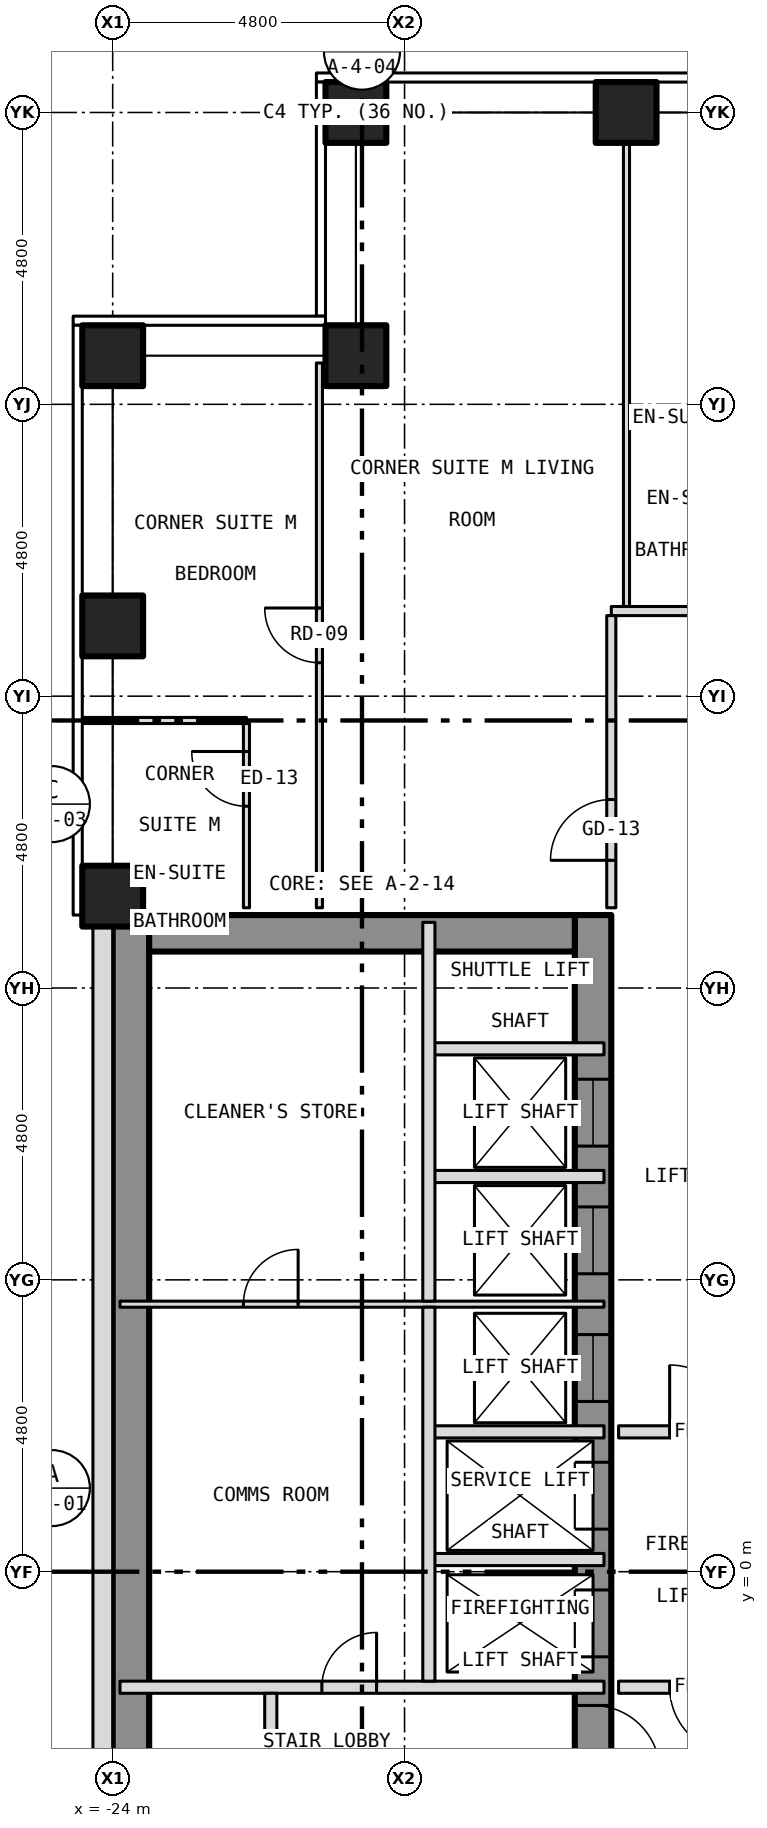
"""IFC4 building model, lengths in metres.
Left out: names, types, materials, properties, quantities, classifications, styles, units other than length and angle.
Written with IfcOpenShell. Run it as: python <this file> out.ifc"""

import sys

from ifc_helpers import new_model, si_unit, direction, frame, frame_2d, origin, origin_2d, place, context, subcontext, project, spatial, rectangle, hollow_rectangle, extrude, element, fill, save


model = new_model("IFC4")
c1 = context("Model", 3, precision=1e-05, world=origin(), true_north=direction((0.0, 1.0)))
c2 = subcontext(c1, "Body", "Model", "MODEL_VIEW")
j1 = project(units=[si_unit("LENGTHUNIT", "METRE"), si_unit("PLANEANGLEUNIT", "RADIAN")], contexts=[c1])
p1 = place(None, origin())
s1 = spatial("IfcSite", under=j1, at=p1, CompositionType="ELEMENT")
p2 = place(p1, origin())
s2 = spatial("IfcBuilding", under=s1, at=p2, CompositionType="ELEMENT")
p3 = place(p2, frame((0.0, 0.0, 53.0)))
s3 = spatial("IfcBuildingStorey", under=s2, at=p3, CompositionType="ELEMENT", Elevation=53.0)
for number, where, z_axis, x_axis in (
    (1, (-20.0, 24.0, -0.15), (0.0, 0.0, 1.0), (1.0, 0.0, 0.0)),
    (2, (-15.556, 24.0, -0.15), (0.0, 0.0, 1.0), (1.0, 0.0, 0.0)),
    (3, (-24.0, 11.111, -0.15), (0.0, 0.0, 1.0), (1.0, 0.0, 0.0)),
    (4, (-24.0, 15.556, -0.15), (0.0, 0.0, 1.0), (1.0, 0.0, 0.0)),
    (5, (-24.0, 20.0, -0.15), (0.0, 0.0, 1.0), (1.0, 0.0, 0.0)),
    (6, (-20.0, 20.0, -0.15), (0.0, 0.0, 1.0), (1.0, 0.0, 0.0)),
):
    element("IfcColumn", number, at=place(p3, frame(where, z_axis=z_axis, x_axis=x_axis)), inside=s3, PredefinedType="COLUMN", context=c2, shape_type="SweptSolid", body=[
        extrude(hollow_rectangle(XDim=1.0, YDim=1.0, WallThickness=0.06, at=origin_2d()), origin(), (0.0, 0.0, 1.0), 3.5),
    ])
p4 = place(p3, frame((-16.1, -10.8, 0.0), z_axis=(0.0, 0.0, 1.0), x_axis=(0.0, 1.0, 0.0)))
e7 = element("IfcWall", 7, at=p4, inside=s3, PredefinedType="SHEAR", context=c2, shape_type="SweptSolid", body=[
    extrude(rectangle(XDim=21.6, YDim=0.6, at=frame_2d((10.8, 0.0))), origin(), (0.0, 0.0, 1.0), 3.25),
])
p5 = place(p4, frame((9.4, 0.0, 0.0)))
e8 = element("IfcOpeningElement", 8, at=p5, cuts=e7, PredefinedType="OPENING", context=c2, shape_type="SweptSolid", body=[
    extrude(rectangle(XDim=1.1, YDim=2.1, at=frame_2d((0.55, 1.05))), frame((0.0, 0.312, 0.0), z_axis=(0.0, -1.0, 0.0), x_axis=(1.0, 0.0, 0.0)), (0.0, 0.0, 1.0), 0.624),
])
p6 = place(p4, frame((11.5, 0.0, 0.0)))
e9 = element("IfcOpeningElement", 9, at=p6, cuts=e7, PredefinedType="OPENING", context=c2, shape_type="SweptSolid", body=[
    extrude(rectangle(XDim=1.1, YDim=2.1, at=frame_2d((0.55, 1.05))), frame((0.0, 0.312, 0.0), z_axis=(0.0, -1.0, 0.0), x_axis=(1.0, 0.0, 0.0)), (0.0, 0.0, 1.0), 0.624),
])
p7 = place(p4, frame((13.6, 0.0, 0.0)))
e10 = element("IfcOpeningElement", 10, at=p7, cuts=e7, PredefinedType="OPENING", context=c2, shape_type="SweptSolid", body=[
    extrude(rectangle(XDim=1.1, YDim=2.1, at=frame_2d((0.55, 1.05))), frame((0.0, 0.312, 0.0), z_axis=(0.0, -1.0, 0.0), x_axis=(1.0, 0.0, 0.0)), (0.0, 0.0, 1.0), 0.624),
])
p8 = place(p4, frame((15.7, 0.0, 0.0)))
e11 = element("IfcOpeningElement", 11, at=p8, cuts=e7, PredefinedType="OPENING", context=c2, shape_type="SweptSolid", body=[
    extrude(rectangle(XDim=1.1, YDim=2.1, at=frame_2d((0.55, 1.05))), frame((0.0, 0.312, 0.0), z_axis=(0.0, -1.0, 0.0), x_axis=(1.0, 0.0, 0.0)), (0.0, 0.0, 1.0), 0.624),
])
p9 = place(p4, frame((17.8, 0.0, 0.0)))
e12 = element("IfcOpeningElement", 12, at=p9, cuts=e7, PredefinedType="OPENING", context=c2, shape_type="SweptSolid", body=[
    extrude(rectangle(XDim=1.1, YDim=2.1, at=frame_2d((0.55, 1.05))), frame((0.0, 0.312, 0.0), z_axis=(0.0, -1.0, 0.0), x_axis=(1.0, 0.0, 0.0)), (0.0, 0.0, 1.0), 0.624),
])
p10 = place(p4, frame((0.758, 0.0, 0.0)))
e13 = element("IfcOpeningElement", 13, at=p10, cuts=e7, PredefinedType="OPENING", context=c2, shape_type="SweptSolid", body=[
    extrude(rectangle(XDim=1.1, YDim=2.1, at=frame_2d((0.55, 1.05))), frame((0.0, 0.312, 0.0), z_axis=(0.0, -1.0, 0.0), x_axis=(1.0, 0.0, 0.0)), (0.0, 0.0, 1.0), 0.624),
])
p11 = place(p4, frame((7.5, 0.0, 0.0)))
e14 = element("IfcOpeningElement", 14, at=p11, cuts=e7, PredefinedType="OPENING", context=c2, shape_type="SweptSolid", body=[
    extrude(rectangle(XDim=1.1, YDim=2.1, at=frame_2d((0.55, 1.05))), frame((0.0, 0.312, 0.0), z_axis=(0.0, -1.0, 0.0), x_axis=(1.0, 0.0, 0.0)), (0.0, 0.0, 1.0), 0.624),
])
p12 = place(p3, frame((-23.7, -10.8, 0.0), z_axis=(0.0, 0.0, 1.0), x_axis=(0.0, 1.0, 0.0)))
e15 = element("IfcWall", 15, at=p12, inside=s3, PredefinedType="SHEAR", context=c2, shape_type="SweptSolid", body=[
    extrude(rectangle(XDim=21.6, YDim=0.6, at=frame_2d((10.8, 0.0))), origin(), (0.0, 0.0, 1.0), 3.25),
])
p13 = place(p3, frame((-23.4, 10.5, 0.0), z_axis=(0.0, 0.0, 1.0), x_axis=(1.0, 0.0, 0.0)))
e16 = element("IfcWall", 16, at=p13, inside=s3, PredefinedType="SHEAR", context=c2, shape_type="SweptSolid", body=[
    extrude(rectangle(XDim=7.0, YDim=0.6, at=frame_2d((3.5, 0.0))), origin(), (0.0, 0.0, 1.0), 3.25),
])
p14 = place(p3, frame((-24.163, 10.8, 0.0), z_axis=(0.0, 0.0, 1.0), x_axis=(0.0, -1.0, 0.0)))
e17 = element("IfcWall", 17, at=p14, inside=s3, PredefinedType="SOLIDWALL", context=c2, shape_type="SweptSolid", body=[
    extrude(rectangle(XDim=21.6, YDim=0.325, at=frame_2d((10.8, 0.0))), origin(), (0.0, 0.0, 1.0), 3.5),
])
p15 = place(p14, frame((18.05, 0.0, 1.0)))
e18 = element("IfcOpeningElement", 18, at=p15, cuts=e17, PredefinedType="OPENING", context=c2, shape_type="SweptSolid", body=[
    extrude(rectangle(XDim=0.6, YDim=1.5, at=frame_2d((0.3, 0.75))), frame((0.0, 0.175, 0.0), z_axis=(0.0, -1.0, 0.0), x_axis=(1.0, 0.0, 0.0)), (0.0, 0.0, 1.0), 0.349),
])
p16 = place(p3, frame((-23.88, -1.9, 0.0), z_axis=(0.0, 0.0, 1.0), x_axis=(1.0, 0.0, 0.0)))
e19 = element("IfcWall", 19, at=p16, inside=s3, PredefinedType="PARTITIONING", context=c2, shape_type="SweptSolid", body=[
    extrude(rectangle(XDim=7.96, YDim=0.2, at=frame_2d((3.98, 0.0))), origin(), (0.0, 0.0, 1.0), 3.25),
])
p17 = place(p16, frame((3.32, 0.0, 0.0)))
e20 = element("IfcOpeningElement", 20, at=p17, cuts=e19, PredefinedType="OPENING", context=c2, shape_type="SweptSolid", body=[
    extrude(rectangle(XDim=0.9, YDim=2.1, at=frame_2d((0.45, 1.05))), frame((0.0, 0.112, 0.0), z_axis=(0.0, -1.0, 0.0), x_axis=(1.0, 0.0, 0.0)), (0.0, 0.0, 1.0), 0.224),
])
p18 = place(p3, frame((-15.68, -1.9, 0.0), z_axis=(0.0, 0.0, 1.0), x_axis=(1.0, 0.0, 0.0)))
e21 = element("IfcWall", 21, at=p18, inside=s3, PredefinedType="PARTITIONING", context=c2, shape_type="SweptSolid", body=[
    extrude(rectangle(XDim=3.28, YDim=0.2, at=frame_2d((1.64, 0.0))), origin(), (0.0, 0.0, 1.0), 3.35),
])
p19 = place(p18, frame((0.84, 0.0, 0.0)))
e22 = element("IfcOpeningElement", 22, at=p19, cuts=e21, PredefinedType="OPENING", context=c2, shape_type="SweptSolid", body=[
    extrude(rectangle(XDim=1.1, YDim=2.1, at=frame_2d((0.55, 1.05))), frame((0.0, 0.112, 0.0), z_axis=(0.0, -1.0, 0.0), x_axis=(1.0, 0.0, 0.0)), (0.0, 0.0, 1.0), 0.224),
])
for number, where, z_axis, x_axis in (
    (23, (-18.8, 0.2, 0.0), (0.0, 0.0, 1.0), (1.0, 0.0, 0.0)),
    (24, (-18.8, 2.3, 0.0), (0.0, 0.0, 1.0), (1.0, 0.0, 0.0)),
):
    element("IfcWall", number, at=place(p3, frame(where, z_axis=z_axis, x_axis=x_axis)), inside=s3, PredefinedType="PARTITIONING", context=c2, shape_type="SweptSolid", body=[
        extrude(rectangle(XDim=2.88, YDim=0.2, at=frame_2d((1.44, 0.0))), origin(), (0.0, 0.0, 1.0), 3.25),
    ])
p20 = place(p3, frame((-15.68, 2.3, 0.0), z_axis=(0.0, 0.0, 1.0), x_axis=(1.0, 0.0, 0.0)))
e25 = element("IfcWall", 25, at=p20, inside=s3, PredefinedType="PARTITIONING", context=c2, shape_type="SweptSolid", body=[
    extrude(rectangle(XDim=3.28, YDim=0.2, at=frame_2d((1.64, 0.0))), origin(), (0.0, 0.0, 1.0), 3.35),
])
p21 = place(p20, frame((0.84, 0.0, 0.0)))
e26 = element("IfcOpeningElement", 26, at=p21, cuts=e25, PredefinedType="OPENING", context=c2, shape_type="SweptSolid", body=[
    extrude(rectangle(XDim=1.1, YDim=2.1, at=frame_2d((0.55, 1.05))), frame((0.0, 0.112, 0.0), z_axis=(0.0, -1.0, 0.0), x_axis=(1.0, 0.0, 0.0)), (0.0, 0.0, 1.0), 0.224),
])
p22 = place(p3, frame((-23.88, 4.4, 0.0), z_axis=(0.0, 0.0, 1.0), x_axis=(1.0, 0.0, 0.0)))
e27 = element("IfcWall", 27, at=p22, inside=s3, PredefinedType="PARTITIONING", context=c2, shape_type="SweptSolid", body=[
    extrude(rectangle(XDim=7.96, YDim=0.1, at=frame_2d((3.98, 0.0))), origin(), (0.0, 0.0, 1.0), 3.25),
])
p23 = place(p22, frame((2.03, 0.0, 0.0)))
e28 = element("IfcOpeningElement", 28, at=p23, cuts=e27, PredefinedType="OPENING", context=c2, shape_type="SweptSolid", body=[
    extrude(rectangle(XDim=0.9, YDim=2.1, at=frame_2d((0.45, 1.05))), frame((0.0, 0.062, 0.0), z_axis=(0.0, -1.0, 0.0), x_axis=(1.0, 0.0, 0.0)), (0.0, 0.0, 1.0), 0.124),
])
for number, where, z_axis, x_axis in (
    (29, (-18.8, 6.5, 0.0), (0.0, 0.0, 1.0), (1.0, 0.0, 0.0)),
    (30, (-18.8, 8.6, 0.0), (0.0, 0.0, 1.0), (1.0, 0.0, 0.0)),
):
    element("IfcWall", number, at=place(p3, frame(where, z_axis=z_axis, x_axis=x_axis)), inside=s3, PredefinedType="PARTITIONING", context=c2, shape_type="SweptSolid", body=[
        extrude(rectangle(XDim=2.88, YDim=0.2, at=frame_2d((1.44, 0.0))), origin(), (0.0, 0.0, 1.0), 3.25),
    ])
p24 = place(p3, frame((-24.53, 14.0, 0.0), z_axis=(0.0, 0.0, 1.0), x_axis=(1.0, 0.0, 0.0)))
e31 = element("IfcWall", 31, at=p24, inside=s3, PredefinedType="PARTITIONING", context=c2, shape_type="SweptSolid", body=[
    extrude(rectangle(XDim=2.73, YDim=0.1, at=frame_2d((1.365, 0.0))), origin(), (0.0, 0.0, 1.0), 3.35),
])
p25 = place(p3, frame((-15.8, 15.8, 0.0), z_axis=(0.0, 0.0, 1.0), x_axis=(1.0, 0.0, 0.0)))
e32 = element("IfcWall", 32, at=p25, inside=s3, PredefinedType="PARTITIONING", context=c2, shape_type="SweptSolid", body=[
    extrude(rectangle(XDim=31.6, YDim=0.15, at=frame_2d((15.8, 0.0))), origin(), (0.0, 0.0, 1.0), 3.35),
])
p26 = place(p25, frame((4.178, 0.0, 0.0)))
e33 = element("IfcOpeningElement", 33, at=p26, cuts=e32, PredefinedType="OPENING", context=c2, shape_type="SweptSolid", body=[
    extrude(rectangle(XDim=1.0, YDim=2.1, at=frame_2d((0.5, 1.05))), frame((0.0, 0.087, 0.0), z_axis=(0.0, -1.0, 0.0), x_axis=(1.0, 0.0, 0.0)), (0.0, 0.0, 1.0), 0.174),
])
p27 = place(p25, frame((9.734, 0.0, 0.0)))
e34 = element("IfcOpeningElement", 34, at=p27, cuts=e32, PredefinedType="OPENING", context=c2, shape_type="SweptSolid", body=[
    extrude(rectangle(XDim=1.0, YDim=2.1, at=frame_2d((0.5, 1.05))), frame((0.0, 0.087, 0.0), z_axis=(0.0, -1.0, 0.0), x_axis=(1.0, 0.0, 0.0)), (0.0, 0.0, 1.0), 0.174),
])
p28 = place(p25, frame((14.178, 0.0, 0.0)))
e35 = element("IfcOpeningElement", 35, at=p28, cuts=e32, PredefinedType="OPENING", context=c2, shape_type="SweptSolid", body=[
    extrude(rectangle(XDim=1.0, YDim=2.1, at=frame_2d((0.5, 1.05))), frame((0.0, 0.087, 0.0), z_axis=(0.0, -1.0, 0.0), x_axis=(1.0, 0.0, 0.0)), (0.0, 0.0, 1.0), 0.174),
])
p29 = place(p25, frame((17.534, 0.0, 0.0)))
e36 = element("IfcOpeningElement", 36, at=p29, cuts=e32, PredefinedType="OPENING", context=c2, shape_type="SweptSolid", body=[
    extrude(rectangle(XDim=1.0, YDim=2.1, at=frame_2d((0.5, 1.05))), frame((0.0, 0.087, 0.0), z_axis=(0.0, -1.0, 0.0), x_axis=(1.0, 0.0, 0.0)), (0.0, 0.0, 1.0), 0.174),
])
p30 = place(p25, frame((25.289, 0.0, 0.0)))
e37 = element("IfcOpeningElement", 37, at=p30, cuts=e32, PredefinedType="OPENING", context=c2, shape_type="SweptSolid", body=[
    extrude(rectangle(XDim=1.0, YDim=2.1, at=frame_2d((0.5, 1.05))), frame((0.0, 0.087, 0.0), z_axis=(0.0, -1.0, 0.0), x_axis=(1.0, 0.0, 0.0)), (0.0, 0.0, 1.0), 0.174),
])
p31 = place(p25, frame((29.733, 0.0, 0.0)))
e38 = element("IfcOpeningElement", 38, at=p31, cuts=e32, PredefinedType="OPENING", context=c2, shape_type="SweptSolid", body=[
    extrude(rectangle(XDim=1.0, YDim=2.1, at=frame_2d((0.5, 1.05))), frame((0.0, 0.087, 0.0), z_axis=(0.0, -1.0, 0.0), x_axis=(1.0, 0.0, 0.0)), (0.0, 0.0, 1.0), 0.174),
])
p32 = place(p3, frame((-15.55, 19.0, 0.0), z_axis=(0.0, 0.0, 1.0), x_axis=(1.0, 0.0, 0.0)))
e39 = element("IfcWall", 39, at=p32, inside=s3, PredefinedType="PARTITIONING", context=c2, shape_type="SweptSolid", body=[
    extrude(rectangle(XDim=2.2, YDim=0.1, at=frame_2d((1.1, 0.0))), origin(), (0.0, 0.0, 1.0), 3.35),
])
p33 = place(p3, frame((-21.8, 10.92, 0.0), z_axis=(0.0, 0.0, 1.0), x_axis=(0.0, 1.0, 0.0)))
e40 = element("IfcWall", 40, at=p33, inside=s3, PredefinedType="PARTITIONING", context=c2, shape_type="SweptSolid", body=[
    extrude(rectangle(XDim=3.03, YDim=0.1, at=frame_2d((1.515, 0.0))), origin(), (0.0, 0.0, 1.0), 3.35),
])
p34 = place(p33, frame((1.67, 0.0, 0.0)))
e41 = element("IfcOpeningElement", 41, at=p34, cuts=e40, PredefinedType="OPENING", context=c2, shape_type="SweptSolid", body=[
    extrude(rectangle(XDim=0.9, YDim=2.1, at=frame_2d((0.45, 1.05))), frame((0.0, 0.062, 0.0), z_axis=(0.0, -1.0, 0.0), x_axis=(1.0, 0.0, 0.0)), (0.0, 0.0, 1.0), 0.124),
])
p35 = place(p3, frame((-21.4, -10.68, 0.0), z_axis=(0.0, 0.0, 1.0), x_axis=(0.0, 1.0, 0.0)))
e42 = element("IfcWall", 42, at=p35, inside=s3, PredefinedType="PARTITIONING", context=c2, shape_type="SweptSolid", body=[
    extrude(rectangle(XDim=8.68, YDim=0.2, at=frame_2d((4.34, 0.0))), origin(), (0.0, 0.0, 1.0), 3.25),
])
p36 = place(p35, frame((3.88, 0.0, 0.0)))
e43 = element("IfcOpeningElement", 43, at=p36, cuts=e42, PredefinedType="OPENING", context=c2, shape_type="SweptSolid", body=[
    extrude(rectangle(XDim=0.9, YDim=2.1, at=frame_2d((0.45, 1.05))), frame((0.0, 0.112, 0.0), z_axis=(0.0, -1.0, 0.0), x_axis=(1.0, 0.0, 0.0)), (0.0, 0.0, 1.0), 0.224),
])
p37 = place(p3, frame((-20.6, 10.92, 0.0), z_axis=(0.0, 0.0, 1.0), x_axis=(0.0, 1.0, 0.0)))
e44 = element("IfcWall", 44, at=p37, inside=s3, PredefinedType="PARTITIONING", context=c2, shape_type="SweptSolid", body=[
    extrude(rectangle(XDim=8.96, YDim=0.1, at=frame_2d((4.48, 0.0))), origin(), (0.0, 0.0, 1.0), 3.35),
])
p38 = place(p37, frame((4.03, 0.0, 0.0)))
e45 = element("IfcOpeningElement", 45, at=p38, cuts=e44, PredefinedType="OPENING", context=c2, shape_type="SweptSolid", body=[
    extrude(rectangle(XDim=0.9, YDim=2.1, at=frame_2d((0.45, 1.05))), frame((0.0, 0.062, 0.0), z_axis=(0.0, -1.0, 0.0), x_axis=(1.0, 0.0, 0.0)), (0.0, 0.0, 1.0), 0.124),
])
p39 = place(p3, frame((-18.8, -1.8, 0.0), z_axis=(0.0, 0.0, 1.0), x_axis=(0.0, 1.0, 0.0)))
e46 = element("IfcWall", 46, at=p39, inside=s3, PredefinedType="PARTITIONING", context=c2, shape_type="SweptSolid", body=[
    extrude(rectangle(XDim=6.15, YDim=0.2, at=frame_2d((3.075, 0.0))), origin(), (0.0, 0.0, 1.0), 3.25),
])
p40 = place(p3, frame((-18.8, 4.45, 0.0), z_axis=(0.0, 0.0, 1.0), x_axis=(0.0, 1.0, 0.0)))
e47 = element("IfcWall", 47, at=p40, inside=s3, PredefinedType="PARTITIONING", context=c2, shape_type="SweptSolid", body=[
    extrude(rectangle(XDim=6.23, YDim=0.2, at=frame_2d((3.115, 0.0))), origin(), (0.0, 0.0, 1.0), 3.25),
])
p41 = place(p3, frame((-15.8, 10.92, 0.0), z_axis=(0.0, 0.0, 1.0), x_axis=(0.0, 1.0, 0.0)))
e48 = element("IfcWall", 48, at=p41, inside=s3, PredefinedType="PARTITIONING", context=c2, shape_type="SweptSolid", body=[
    extrude(rectangle(XDim=4.805, YDim=0.15, at=frame_2d((2.403, 0.0))), origin(), (0.0, 0.0, 1.0), 3.35),
])
p42 = place(p41, frame((0.78, 0.0, 0.0)))
e49 = element("IfcOpeningElement", 49, at=p42, cuts=e48, PredefinedType="OPENING", context=c2, shape_type="SweptSolid", body=[
    extrude(rectangle(XDim=1.0, YDim=2.1, at=frame_2d((0.5, 1.05))), frame((0.0, 0.087, 0.0), z_axis=(0.0, -1.0, 0.0), x_axis=(1.0, 0.0, 0.0)), (0.0, 0.0, 1.0), 0.174),
])
p43 = place(p3, frame((-15.55, 15.875, 0.0), z_axis=(0.0, 0.0, 1.0), x_axis=(0.0, 1.0, 0.0)))
e50 = element("IfcWall", 50, at=p43, inside=s3, PredefinedType="PARTITIONING", context=c2, shape_type="SweptSolid", body=[
    extrude(rectangle(XDim=8.005, YDim=0.1, at=frame_2d((4.002, 0.0))), origin(), (0.0, 0.0, 1.0), 3.35),
])
p44 = place(p5, origin())
e51 = element("IfcDoor", 51, at=p44, inside=s3, OperationType="SLIDING_TO_LEFT", PredefinedType="DOOR", context=c2, shape_type="SweptSolid", body=[
    extrude(rectangle(XDim=1.1, YDim=2.1, at=frame_2d((0.55, 1.05))), frame((0.0, 0.025, 0.0), z_axis=(0.0, -1.0, 0.0), x_axis=(1.0, 0.0, 0.0)), (0.0, 0.0, 1.0), 0.05),
])
fill(e8, e51)
p45 = place(p6, origin())
e52 = element("IfcDoor", 52, at=p45, inside=s3, OperationType="SLIDING_TO_LEFT", PredefinedType="DOOR", context=c2, shape_type="SweptSolid", body=[
    extrude(rectangle(XDim=1.1, YDim=2.1, at=frame_2d((0.55, 1.05))), frame((0.0, 0.025, 0.0), z_axis=(0.0, -1.0, 0.0), x_axis=(1.0, 0.0, 0.0)), (0.0, 0.0, 1.0), 0.05),
])
fill(e9, e52)
p46 = place(p7, origin())
e53 = element("IfcDoor", 53, at=p46, inside=s3, OperationType="SLIDING_TO_LEFT", PredefinedType="DOOR", context=c2, shape_type="SweptSolid", body=[
    extrude(rectangle(XDim=1.1, YDim=2.1, at=frame_2d((0.55, 1.05))), frame((0.0, 0.025, 0.0), z_axis=(0.0, -1.0, 0.0), x_axis=(1.0, 0.0, 0.0)), (0.0, 0.0, 1.0), 0.05),
])
fill(e10, e53)
p47 = place(p8, origin())
e54 = element("IfcDoor", 54, at=p47, inside=s3, OperationType="SLIDING_TO_LEFT", PredefinedType="DOOR", context=c2, shape_type="SweptSolid", body=[
    extrude(rectangle(XDim=1.1, YDim=2.1, at=frame_2d((0.55, 1.05))), frame((0.0, 0.025, 0.0), z_axis=(0.0, -1.0, 0.0), x_axis=(1.0, 0.0, 0.0)), (0.0, 0.0, 1.0), 0.05),
])
fill(e11, e54)
p48 = place(p9, origin())
e55 = element("IfcDoor", 55, at=p48, inside=s3, OperationType="SLIDING_TO_LEFT", PredefinedType="DOOR", context=c2, shape_type="SweptSolid", body=[
    extrude(rectangle(XDim=1.1, YDim=2.1, at=frame_2d((0.55, 1.05))), frame((0.0, 0.025, 0.0), z_axis=(0.0, -1.0, 0.0), x_axis=(1.0, 0.0, 0.0)), (0.0, 0.0, 1.0), 0.05),
])
fill(e12, e55)
p49 = place(p11, origin())
e56 = element("IfcDoor", 56, at=p49, inside=s3, OperationType="SINGLE_SWING_LEFT", PredefinedType="DOOR", context=c2, shape_type="SweptSolid", body=[
    extrude(rectangle(XDim=1.1, YDim=2.1, at=frame_2d((0.55, 1.05))), frame((0.0, 0.025, 0.0), z_axis=(0.0, -1.0, 0.0), x_axis=(1.0, 0.0, 0.0)), (0.0, 0.0, 1.0), 0.05),
])
fill(e14, e56)
p50 = place(p17, origin())
e57 = element("IfcDoor", 57, at=p50, inside=s3, OperationType="SINGLE_SWING_RIGHT", PredefinedType="DOOR", context=c2, shape_type="SweptSolid", body=[
    extrude(rectangle(XDim=0.9, YDim=2.1, at=frame_2d((0.45, 1.05))), frame((0.0, 0.025, 0.0), z_axis=(0.0, -1.0, 0.0), x_axis=(1.0, 0.0, 0.0)), (0.0, 0.0, 1.0), 0.05),
])
fill(e20, e57)
p51 = place(p23, origin())
e58 = element("IfcDoor", 58, at=p51, inside=s3, OperationType="SINGLE_SWING_RIGHT", PredefinedType="DOOR", context=c2, shape_type="SweptSolid", body=[
    extrude(rectangle(XDim=0.9, YDim=2.1, at=frame_2d((0.45, 1.05))), frame((0.0, 0.025, 0.0), z_axis=(0.0, -1.0, 0.0), x_axis=(1.0, 0.0, 0.0)), (0.0, 0.0, 1.0), 0.05),
])
fill(e28, e58)
p52 = place(p21, origin())
e59 = element("IfcDoor", 59, at=p52, inside=s3, OperationType="SINGLE_SWING_LEFT", PredefinedType="DOOR", context=c2, shape_type="SweptSolid", body=[
    extrude(rectangle(XDim=1.1, YDim=2.1, at=frame_2d((0.55, 1.05))), frame((0.0, 0.025, 0.0), z_axis=(0.0, -1.0, 0.0), x_axis=(1.0, 0.0, 0.0)), (0.0, 0.0, 1.0), 0.05),
])
fill(e26, e59)
p53 = place(p19, origin())
e60 = element("IfcDoor", 60, at=p53, inside=s3, OperationType="SINGLE_SWING_RIGHT", PredefinedType="DOOR", context=c2, shape_type="SweptSolid", body=[
    extrude(rectangle(XDim=1.1, YDim=2.1, at=frame_2d((0.55, 1.05))), frame((0.0, 0.025, 0.0), z_axis=(0.0, -1.0, 0.0), x_axis=(1.0, 0.0, 0.0)), (0.0, 0.0, 1.0), 0.05),
])
fill(e22, e60)
p54 = place(p42, origin())
e61 = element("IfcDoor", 61, at=p54, inside=s3, OperationType="SINGLE_SWING_LEFT", PredefinedType="DOOR", context=c2, shape_type="SweptSolid", body=[
    extrude(rectangle(XDim=1.0, YDim=2.1, at=frame_2d((0.5, 1.05))), frame((0.0, 0.025, 0.0), z_axis=(0.0, -1.0, 0.0), x_axis=(1.0, 0.0, 0.0)), (0.0, 0.0, 1.0), 0.05),
])
fill(e49, e61)
p55 = place(p38, origin())
e62 = element("IfcDoor", 62, at=p55, inside=s3, OperationType="SINGLE_SWING_RIGHT", PredefinedType="DOOR", context=c2, shape_type="SweptSolid", body=[
    extrude(rectangle(XDim=0.9, YDim=2.1, at=frame_2d((0.45, 1.05))), frame((0.0, 0.025, 0.0), z_axis=(0.0, -1.0, 0.0), x_axis=(1.0, 0.0, 0.0)), (0.0, 0.0, 1.0), 0.05),
])
fill(e45, e62)
p56 = place(p34, origin())
e63 = element("IfcDoor", 63, at=p56, inside=s3, OperationType="SINGLE_SWING_RIGHT", PredefinedType="DOOR", context=c2, shape_type="SweptSolid", body=[
    extrude(rectangle(XDim=0.9, YDim=2.1, at=frame_2d((0.45, 1.05))), frame((0.0, 0.025, 0.0), z_axis=(0.0, -1.0, 0.0), x_axis=(1.0, 0.0, 0.0)), (0.0, 0.0, 1.0), 0.05),
])
fill(e41, e63)
save(model, sys.argv[1])
